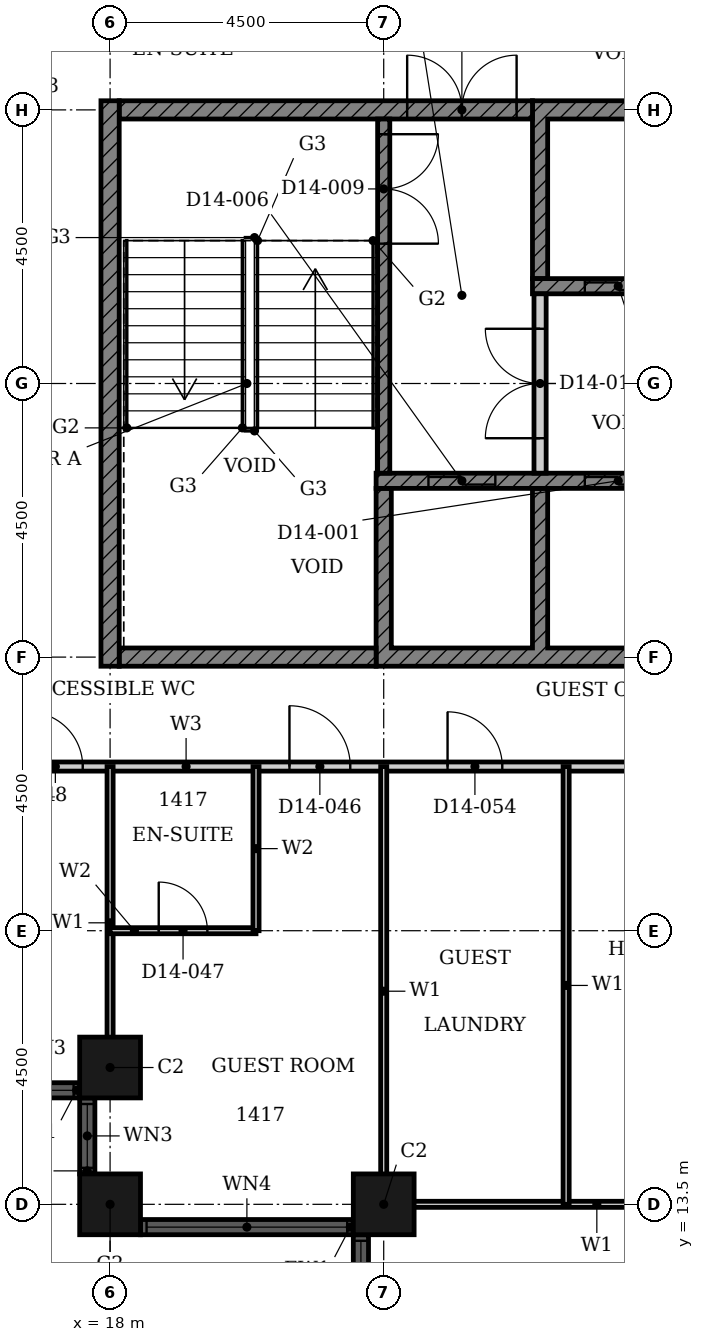
"""IFC4 building model, lengths in metres.
Left out: names, types, materials, properties, quantities, classifications, styles, units other than length and angle.
Written with IfcOpenShell. Run it as: python <this file> out.ifc"""

import sys

from ifc_helpers import new_model, si_unit, direction, frame, frame_2d, origin, origin_2d, place, context, subcontext, project, spatial, polyline, rectangle, hollow_rectangle, outline, extrude, element, fill, save


model = new_model("IFC4")
c1 = context("Model", 3, precision=1e-05, world=origin(), true_north=direction((0.0, 1.0)))
c2 = subcontext(c1, "Body", "Model", "MODEL_VIEW")
j1 = project(units=[si_unit("LENGTHUNIT", "METRE"), si_unit("PLANEANGLEUNIT", "RADIAN")], contexts=[c1])
p1 = place(None, origin())
s1 = spatial("IfcSite", under=j1, at=p1, CompositionType="ELEMENT")
p2 = place(p1, origin())
s2 = spatial("IfcBuilding", under=s1, at=p2, CompositionType="ELEMENT")
p3 = place(p2, frame((0.0, 0.0, 63.6)))
s3 = spatial("IfcBuildingStorey", under=s2, at=p3, CompositionType="ELEMENT", Elevation=63.6)
for number, where, z_axis, x_axis in (
    (1, (18.0, 15.75, 0.0), (0.0, 0.0, 1.0), (1.0, 0.0, 0.0)),
    (2, (18.0, 13.5, 0.0), (0.0, 0.0, 1.0), (1.0, 0.0, 0.0)),
    (3, (22.5, 13.5, 0.0), (0.0, 0.0, 1.0), (1.0, 0.0, 0.0)),
):
    element("IfcColumn", number, at=place(p3, frame(where, z_axis=z_axis, x_axis=x_axis)), inside=s3, PredefinedType="COLUMN", context=c2, shape_type="SweptSolid", body=[
        extrude(hollow_rectangle(XDim=1.0, YDim=1.0, WallThickness=0.032, at=origin_2d()), origin(), (0.0, 0.0, 1.0), 3.6),
    ])
p4 = place(p3, frame((16.25, 15.375, 0.0), z_axis=(0.0, 0.0, 1.0), x_axis=(1.0, 0.0, 0.0)))
e4 = element("IfcWall", 4, at=p4, inside=s3, PredefinedType="SOLIDWALL", context=c2, shape_type="SweptSolid", body=[
    extrude(rectangle(XDim=1.25, YDim=0.25, at=frame_2d((0.625, 0.0))), origin(), (0.0, 0.0, 1.0), 3.6),
])
p5 = place(p4, frame((0.1, 0.0, 0.9)))
e5 = element("IfcOpeningElement", 5, at=p5, cuts=e4, PredefinedType="OPENING", context=c2, shape_type="SweptSolid", body=[
    extrude(rectangle(XDim=1.05, YDim=2.08, at=frame_2d((0.525, 1.04))), frame((0.0, 0.135, 0.0), z_axis=(0.0, -1.0, 0.0), x_axis=(1.0, 0.0, 0.0)), (0.0, 0.0, 1.0), 0.27),
])
p6 = place(p3, frame((17.625, 15.25, 0.0), z_axis=(0.0, 0.0, 1.0), x_axis=(0.0, -1.0, 0.0)))
e6 = element("IfcWall", 6, at=p6, inside=s3, PredefinedType="SOLIDWALL", context=c2, shape_type="SweptSolid", body=[
    extrude(rectangle(XDim=1.25, YDim=0.25, at=frame_2d((0.625, 0.0))), origin(), (0.0, 0.0, 1.0), 3.6),
])
p7 = place(p6, frame((0.1, 0.0, 0.9)))
e7 = element("IfcOpeningElement", 7, at=p7, cuts=e6, PredefinedType="OPENING", context=c2, shape_type="SweptSolid", body=[
    extrude(rectangle(XDim=1.05, YDim=2.08, at=frame_2d((0.525, 1.04))), frame((0.0, 0.135, 0.0), z_axis=(0.0, -1.0, 0.0), x_axis=(1.0, 0.0, 0.0)), (0.0, 0.0, 1.0), 0.27),
])
p8 = place(p3, frame((18.5, 13.125, 0.0), z_axis=(0.0, 0.0, 1.0), x_axis=(1.0, 0.0, 0.0)))
e8 = element("IfcWall", 8, at=p8, inside=s3, PredefinedType="SOLIDWALL", context=c2, shape_type="SweptSolid", body=[
    extrude(rectangle(XDim=3.5, YDim=0.25, at=frame_2d((1.75, 0.0))), origin(), (0.0, 0.0, 1.0), 3.6),
])
p9 = place(p8, frame((0.1, 0.0, 0.9)))
e9 = element("IfcOpeningElement", 9, at=p9, cuts=e8, PredefinedType="OPENING", context=c2, shape_type="SweptSolid", body=[
    extrude(rectangle(XDim=3.3, YDim=2.08, at=frame_2d((1.65, 1.04))), frame((0.0, 0.135, 0.0), z_axis=(0.0, -1.0, 0.0), x_axis=(1.0, 0.0, 0.0)), (0.0, 0.0, 1.0), 0.27),
])
p10 = place(p3, frame((22.125, 13.0, 0.0), z_axis=(0.0, 0.0, 1.0), x_axis=(0.0, -1.0, 0.0)))
e10 = element("IfcWall", 10, at=p10, inside=s3, PredefinedType="SOLIDWALL", context=c2, shape_type="SweptSolid", body=[
    extrude(rectangle(XDim=8.0, YDim=0.25, at=frame_2d((4.0, 0.0))), origin(), (0.0, 0.0, 1.0), 3.6),
])
p11 = place(p10, frame((0.1, 0.0, 0.9)))
e11 = element("IfcOpeningElement", 11, at=p11, cuts=e10, PredefinedType="OPENING", context=c2, shape_type="SweptSolid", body=[
    extrude(rectangle(XDim=3.3, YDim=2.08, at=frame_2d((1.65, 1.04))), frame((0.0, 0.135, 0.0), z_axis=(0.0, -1.0, 0.0), x_axis=(1.0, 0.0, 0.0)), (0.0, 0.0, 1.0), 0.27),
])
p12 = place(p10, frame((4.6, 0.0, 0.9)))
e12 = element("IfcOpeningElement", 12, at=p12, cuts=e10, PredefinedType="OPENING", context=c2, shape_type="SweptSolid", body=[
    extrude(rectangle(XDim=3.3, YDim=2.08, at=frame_2d((1.65, 1.04))), frame((0.0, 0.135, 0.0), z_axis=(0.0, -1.0, 0.0), x_axis=(1.0, 0.0, 0.0)), (0.0, 0.0, 1.0), 0.27),
])
p13 = place(p3, origin())
e13 = element("IfcWall", 13, at=p13, inside=s3, PredefinedType="SHEAR", context=c2, shape_type="SweptSolid", body=[
    extrude(outline(polyline([(22.375, 22.35), (38.053, 22.35), (38.053, 25.275), (37.803, 25.275), (37.803, 22.65), (35.482, 22.65), (35.482, 25.275), (35.232, 25.275), (35.232, 22.65), (32.911, 22.65), (32.911, 25.275), (32.661, 25.275), (32.661, 22.65), (30.339, 22.65), (30.339, 25.275), (30.089, 25.275), (30.089, 22.65), (27.768, 22.65), (27.768, 25.275), (27.518, 25.275), (27.518, 22.65), (25.197, 22.65), (25.197, 25.275), (24.947, 25.275), (24.947, 22.65), (22.625, 22.65), (22.625, 25.275), (22.375, 25.275), (22.375, 22.35)])), origin(), (0.0, 0.0, 1.0), 3.3),
])
p14 = place(p3, origin())
e14 = element("IfcWall", 14, at=p14, inside=s3, PredefinedType="SHEAR", context=c2, shape_type="SweptSolid", body=[
    extrude(outline(polyline([(24.947, 28.725), (25.197, 28.725), (25.197, 31.35), (27.518, 31.35), (27.518, 28.725), (27.768, 28.725), (27.768, 31.35), (30.089, 31.35), (30.089, 28.725), (30.339, 28.725), (30.339, 31.35), (32.661, 31.35), (32.661, 28.725), (32.911, 28.725), (32.911, 31.35), (35.232, 31.35), (35.232, 28.725), (35.482, 28.725), (35.482, 31.35), (37.803, 31.35), (37.803, 28.725), (38.053, 28.725), (38.053, 31.35), (40.375, 31.35), (40.375, 28.725), (40.625, 28.725), (40.625, 31.65), (24.947, 31.65), (24.947, 28.725)])), origin(), (0.0, 0.0, 1.0), 3.3),
])
p15 = place(p3, frame((18.15, 22.5, 0.0), z_axis=(0.0, 0.0, 1.0), x_axis=(1.0, 0.0, 0.0)))
e15 = element("IfcWall", 15, at=p15, inside=s3, PredefinedType="SHEAR", context=c2, shape_type="SweptSolid", body=[
    extrude(rectangle(XDim=4.225, YDim=0.3, at=frame_2d((2.113, 0.0))), origin(), (0.0, 0.0, 1.0), 3.3),
])
p16 = place(p3, frame((18.15, 31.5, 0.0), z_axis=(0.0, 0.0, 1.0), x_axis=(1.0, 0.0, 0.0)))
e16 = element("IfcWall", 16, at=p16, inside=s3, PredefinedType="SHEAR", context=c2, shape_type="SweptSolid", body=[
    extrude(rectangle(XDim=6.797, YDim=0.3, at=frame_2d((3.398, 0.0))), origin(), (0.0, 0.0, 1.0), 3.3),
])
p17 = place(p16, frame((4.736, 0.0, 0.0)))
e17 = element("IfcOpeningElement", 17, at=p17, cuts=e16, PredefinedType="OPENING", context=c2, shape_type="SweptSolid", body=[
    extrude(rectangle(XDim=1.8, YDim=2.1, at=frame_2d((0.9, 1.05))), frame((0.0, 0.16, 0.0), z_axis=(0.0, -1.0, 0.0), x_axis=(1.0, 0.0, 0.0)), (0.0, 0.0, 1.0), 0.32),
])
p18 = place(p3, frame((18.0, 22.35, 0.0), z_axis=(0.0, 0.0, 1.0), x_axis=(0.0, 1.0, 0.0)))
e18 = element("IfcWall", 18, at=p18, inside=s3, PredefinedType="SHEAR", context=c2, shape_type="SweptSolid", body=[
    extrude(rectangle(XDim=9.3, YDim=0.3, at=frame_2d((4.65, 0.0))), origin(), (0.0, 0.0, 1.0), 3.3),
])
p19 = place(p3, frame((22.375, 25.4, 0.0), z_axis=(0.0, 0.0, 1.0), x_axis=(1.0, 0.0, 0.0)))
e19 = element("IfcWall", 19, at=p19, inside=s3, PredefinedType="SHEAR", context=c2, shape_type="SweptSolid", body=[
    extrude(rectangle(XDim=15.678, YDim=0.25, at=frame_2d((7.839, 0.0))), origin(), (0.0, 0.0, 1.0), 3.3),
])
p20 = place(p19, frame((3.432, 0.0, 0.0)))
e20 = element("IfcOpeningElement", 20, at=p20, cuts=e19, PredefinedType="OPENING", context=c2, shape_type="SweptSolid", body=[
    extrude(rectangle(XDim=1.1, YDim=2.1, at=frame_2d((0.55, 1.05))), frame((0.0, 0.135, 0.0), z_axis=(0.0, -1.0, 0.0), x_axis=(1.0, 0.0, 0.0)), (0.0, 0.0, 1.0), 0.27),
])
p21 = place(p19, frame((11.146, 0.0, 0.0)))
e21 = element("IfcOpeningElement", 21, at=p21, cuts=e19, PredefinedType="OPENING", context=c2, shape_type="SweptSolid", body=[
    extrude(rectangle(XDim=1.1, YDim=2.1, at=frame_2d((0.55, 1.05))), frame((0.0, 0.135, 0.0), z_axis=(0.0, -1.0, 0.0), x_axis=(1.0, 0.0, 0.0)), (0.0, 0.0, 1.0), 0.27),
])
p22 = place(p19, frame((13.718, 0.0, 0.0)))
e22 = element("IfcOpeningElement", 22, at=p22, cuts=e19, PredefinedType="OPENING", context=c2, shape_type="SweptSolid", body=[
    extrude(rectangle(XDim=1.1, YDim=2.1, at=frame_2d((0.55, 1.05))), frame((0.0, 0.135, 0.0), z_axis=(0.0, -1.0, 0.0), x_axis=(1.0, 0.0, 0.0)), (0.0, 0.0, 1.0), 0.27),
])
p23 = place(p19, frame((0.861, 0.0, 0.0)))
e23 = element("IfcOpeningElement", 23, at=p23, cuts=e19, PredefinedType="OPENING", context=c2, shape_type="SweptSolid", body=[
    extrude(rectangle(XDim=1.1, YDim=2.1, at=frame_2d((0.55, 1.05))), frame((0.0, 0.135, 0.0), z_axis=(0.0, -1.0, 0.0), x_axis=(1.0, 0.0, 0.0)), (0.0, 0.0, 1.0), 0.27),
])
p24 = place(p3, frame((24.947, 28.6, 0.0), z_axis=(0.0, 0.0, 1.0), x_axis=(1.0, 0.0, 0.0)))
e24 = element("IfcWall", 24, at=p24, inside=s3, PredefinedType="SHEAR", context=c2, shape_type="SweptSolid", body=[
    extrude(rectangle(XDim=15.678, YDim=0.25, at=frame_2d((7.839, 0.0))), origin(), (0.0, 0.0, 1.0), 3.3),
])
p25 = place(p24, frame((0.861, 0.0, 0.0)))
e25 = element("IfcOpeningElement", 25, at=p25, cuts=e24, PredefinedType="OPENING", context=c2, shape_type="SweptSolid", body=[
    extrude(rectangle(XDim=1.1, YDim=2.1, at=frame_2d((0.55, 1.05))), frame((0.0, 0.135, 0.0), z_axis=(0.0, -1.0, 0.0), x_axis=(1.0, 0.0, 0.0)), (0.0, 0.0, 1.0), 0.27),
])
p26 = place(p24, frame((8.575, 0.0, 0.0)))
e26 = element("IfcOpeningElement", 26, at=p26, cuts=e24, PredefinedType="OPENING", context=c2, shape_type="SweptSolid", body=[
    extrude(rectangle(XDim=1.1, YDim=2.1, at=frame_2d((0.55, 1.05))), frame((0.0, 0.135, 0.0), z_axis=(0.0, -1.0, 0.0), x_axis=(1.0, 0.0, 0.0)), (0.0, 0.0, 1.0), 0.27),
])
p27 = place(p24, frame((13.718, 0.0, 0.0)))
e27 = element("IfcOpeningElement", 27, at=p27, cuts=e24, PredefinedType="OPENING", context=c2, shape_type="SweptSolid", body=[
    extrude(rectangle(XDim=1.1, YDim=2.1, at=frame_2d((0.55, 1.05))), frame((0.0, 0.135, 0.0), z_axis=(0.0, -1.0, 0.0), x_axis=(1.0, 0.0, 0.0)), (0.0, 0.0, 1.0), 0.27),
])
p28 = place(p3, frame((22.5, 31.35, 0.0), z_axis=(0.0, 0.0, 1.0), x_axis=(0.0, -1.0, 0.0)))
e28 = element("IfcWall", 28, at=p28, inside=s3, PredefinedType="SHEAR", context=c2, shape_type="SweptSolid", body=[
    extrude(rectangle(XDim=5.825, YDim=0.2, at=frame_2d((2.913, 0.0))), origin(), (0.0, 0.0, 1.0), 3.3),
])
p29 = place(p28, frame((0.25, 0.0, 0.0)))
e29 = element("IfcOpeningElement", 29, at=p29, cuts=e28, PredefinedType="OPENING", context=c2, shape_type="SweptSolid", body=[
    extrude(rectangle(XDim=1.8, YDim=2.1, at=frame_2d((0.9, 1.05))), frame((0.0, 0.11, 0.0), z_axis=(0.0, -1.0, 0.0), x_axis=(1.0, 0.0, 0.0)), (0.0, 0.0, 1.0), 0.22),
])
p30 = place(p3, frame((25.072, 25.525, 0.0), z_axis=(0.0, 0.0, 1.0), x_axis=(0.0, 1.0, 0.0)))
e30 = element("IfcWall", 30, at=p30, inside=s3, PredefinedType="PARTITIONING", context=c2, shape_type="SweptSolid", body=[
    extrude(rectangle(XDim=2.95, YDim=0.2, at=frame_2d((1.475, 0.0))), origin(), (0.0, 0.0, 1.0), 3.3),
])
p31 = place(p30, frame((0.575, 0.0, 0.0)))
e31 = element("IfcOpeningElement", 31, at=p31, cuts=e30, PredefinedType="OPENING", context=c2, shape_type="SweptSolid", body=[
    extrude(rectangle(XDim=1.8, YDim=2.1, at=frame_2d((0.9, 1.05))), frame((0.0, 0.11, 0.0), z_axis=(0.0, -1.0, 0.0), x_axis=(1.0, 0.0, 0.0)), (0.0, 0.0, 1.0), 0.22),
])
p32 = place(p3, frame((16.2, 20.7, 0.0), z_axis=(0.0, 0.0, 1.0), x_axis=(1.0, 0.0, 0.0)))
e32 = element("IfcWall", 32, at=p32, inside=s3, PredefinedType="PARTITIONING", context=c2, shape_type="SweptSolid", body=[
    extrude(rectangle(XDim=13.5, YDim=0.15, at=frame_2d((6.75, 0.0))), origin(), (0.0, 0.0, 1.0), 3.3),
])
p33 = place(p32, frame((4.75, 0.0, 0.0)))
e33 = element("IfcOpeningElement", 33, at=p33, cuts=e32, PredefinedType="OPENING", context=c2, shape_type="SweptSolid", body=[
    extrude(rectangle(XDim=1.0, YDim=2.1, at=frame_2d((0.5, 1.05))), frame((0.0, 0.085, 0.0), z_axis=(0.0, -1.0, 0.0), x_axis=(1.0, 0.0, 0.0)), (0.0, 0.0, 1.0), 0.17),
])
p34 = place(p32, frame((0.45, 0.0, 0.0)))
e34 = element("IfcOpeningElement", 34, at=p34, cuts=e32, PredefinedType="OPENING", context=c2, shape_type="SweptSolid", body=[
    extrude(rectangle(XDim=0.9, YDim=2.1, at=frame_2d((0.45, 1.05))), frame((0.0, 0.085, 0.0), z_axis=(0.0, -1.0, 0.0), x_axis=(1.0, 0.0, 0.0)), (0.0, 0.0, 1.0), 0.17),
])
p35 = place(p32, frame((7.35, 0.0, 0.0)))
e35 = element("IfcOpeningElement", 35, at=p35, cuts=e32, PredefinedType="OPENING", context=c2, shape_type="SweptSolid", body=[
    extrude(rectangle(XDim=0.9, YDim=2.1, at=frame_2d((0.45, 1.05))), frame((0.0, 0.085, 0.0), z_axis=(0.0, -1.0, 0.0), x_axis=(1.0, 0.0, 0.0)), (0.0, 0.0, 1.0), 0.17),
])
p36 = place(p32, frame((10.95, 0.0, 0.0)))
e36 = element("IfcOpeningElement", 36, at=p36, cuts=e32, PredefinedType="OPENING", context=c2, shape_type="SweptSolid", body=[
    extrude(rectangle(XDim=0.9, YDim=2.1, at=frame_2d((0.45, 1.05))), frame((0.0, 0.085, 0.0), z_axis=(0.0, -1.0, 0.0), x_axis=(1.0, 0.0, 0.0)), (0.0, 0.0, 1.0), 0.17),
])
p37 = place(p3, frame((22.31, 13.5, 0.0), z_axis=(0.0, 0.0, 1.0), x_axis=(1.0, 0.0, 0.0)))
e37 = element("IfcWall", 37, at=p37, inside=s3, PredefinedType="PARTITIONING", context=c2, shape_type="SweptSolid", body=[
    extrude(rectangle(XDim=7.39, YDim=0.1, at=frame_2d((3.695, 0.0))), origin(), (0.0, 0.0, 1.0), 2.38),
])
p38 = place(p3, frame((18.0, 15.56, 0.0), z_axis=(0.0, 0.0, 1.0), x_axis=(0.0, 1.0, 0.0)))
e38 = element("IfcWall", 38, at=p38, inside=s3, PredefinedType="PARTITIONING", context=c2, shape_type="SweptSolid", body=[
    extrude(rectangle(XDim=5.14, YDim=0.1, at=frame_2d((2.57, 0.0))), origin(), (0.0, 0.0, 1.0), 3.3),
])
p39 = place(p3, frame((22.5, 13.31, 0.0), z_axis=(0.0, 0.0, 1.0), x_axis=(0.0, 1.0, 0.0)))
e39 = element("IfcWall", 39, at=p39, inside=s3, PredefinedType="PARTITIONING", context=c2, shape_type="SweptSolid", body=[
    extrude(rectangle(XDim=7.39, YDim=0.1, at=frame_2d((3.695, 0.0))), origin(), (0.0, 0.0, 1.0), 3.3),
])
p40 = place(p3, frame((25.5, 13.5, 0.0), z_axis=(0.0, 0.0, 1.0), x_axis=(0.0, 1.0, 0.0)))
e40 = element("IfcWall", 40, at=p40, inside=s3, PredefinedType="PARTITIONING", context=c2, shape_type="SweptSolid", body=[
    extrude(rectangle(XDim=7.2, YDim=0.1, at=frame_2d((3.6, 0.0))), origin(), (0.0, 0.0, 1.0), 3.3),
])
p41 = place(p3, frame((18.0, 18.0, 0.0), z_axis=(0.0, 0.0, 1.0), x_axis=(1.0, 0.0, 0.0)))
e41 = element("IfcWall", 41, at=p41, inside=s3, PredefinedType="PARTITIONING", context=c2, shape_type="SweptSolid", body=[
    extrude(rectangle(XDim=2.4, YDim=0.1, at=frame_2d((1.2, 0.0))), origin(), (0.0, 0.0, 1.0), 3.3),
])
p42 = place(p41, frame((0.8, 0.0, 0.0)))
e42 = element("IfcOpeningElement", 42, at=p42, cuts=e41, PredefinedType="OPENING", context=c2, shape_type="SweptSolid", body=[
    extrude(rectangle(XDim=0.8, YDim=2.1, at=frame_2d((0.4, 1.05))), frame((0.0, 0.06, 0.0), z_axis=(0.0, -1.0, 0.0), x_axis=(1.0, 0.0, 0.0)), (0.0, 0.0, 1.0), 0.12),
])
p43 = place(p3, frame((20.4, 18.0, 0.0), z_axis=(0.0, 0.0, 1.0), x_axis=(0.0, 1.0, 0.0)))
e43 = element("IfcWall", 43, at=p43, inside=s3, PredefinedType="PARTITIONING", context=c2, shape_type="SweptSolid", body=[
    extrude(rectangle(XDim=2.7, YDim=0.1, at=frame_2d((1.35, 0.0))), origin(), (0.0, 0.0, 1.0), 3.3),
])
p44 = place(p5, origin())
e44 = element("IfcWindow", 44, at=p44, inside=s3, PartitioningType="SINGLE_PANEL", PredefinedType="WINDOW", context=c2, shape_type="SweptSolid", body=[
    extrude(rectangle(XDim=1.05, YDim=2.08, at=frame_2d((0.525, 1.04))), frame((0.0, 0.03, 0.0), z_axis=(0.0, -1.0, 0.0), x_axis=(1.0, 0.0, 0.0)), (0.0, 0.0, 1.0), 0.06),
])
fill(e5, e44)
p45 = place(p7, origin())
e45 = element("IfcWindow", 45, at=p45, inside=s3, PartitioningType="SINGLE_PANEL", PredefinedType="WINDOW", context=c2, shape_type="SweptSolid", body=[
    extrude(rectangle(XDim=1.05, YDim=2.08, at=frame_2d((0.525, 1.04))), frame((0.0, 0.03, 0.0), z_axis=(0.0, -1.0, 0.0), x_axis=(1.0, 0.0, 0.0)), (0.0, 0.0, 1.0), 0.06),
])
fill(e7, e45)
p46 = place(p9, origin())
e46 = element("IfcWindow", 46, at=p46, inside=s3, PartitioningType="SINGLE_PANEL", PredefinedType="WINDOW", context=c2, shape_type="SweptSolid", body=[
    extrude(rectangle(XDim=3.3, YDim=2.08, at=frame_2d((1.65, 1.04))), frame((0.0, 0.03, 0.0), z_axis=(0.0, -1.0, 0.0), x_axis=(1.0, 0.0, 0.0)), (0.0, 0.0, 1.0), 0.06),
])
fill(e9, e46)
p47 = place(p11, origin())
e47 = element("IfcWindow", 47, at=p47, inside=s3, PartitioningType="SINGLE_PANEL", PredefinedType="WINDOW", context=c2, shape_type="SweptSolid", body=[
    extrude(rectangle(XDim=3.3, YDim=2.08, at=frame_2d((1.65, 1.04))), frame((0.0, 0.03, 0.0), z_axis=(0.0, -1.0, 0.0), x_axis=(1.0, 0.0, 0.0)), (0.0, 0.0, 1.0), 0.06),
])
fill(e11, e47)
p48 = place(p20, origin())
e48 = element("IfcDoor", 48, at=p48, inside=s3, OperationType="DOUBLE_DOOR_SLIDING", PredefinedType="DOOR", context=c2, shape_type="SweptSolid", body=[
    extrude(rectangle(XDim=1.1, YDim=2.1, at=frame_2d((0.55, 1.05))), frame((0.0, 0.025, 0.0), z_axis=(0.0, -1.0, 0.0), x_axis=(1.0, 0.0, 0.0)), (0.0, 0.0, 1.0), 0.05),
])
fill(e20, e48)
p49 = place(p25, origin())
e49 = element("IfcDoor", 49, at=p49, inside=s3, OperationType="DOUBLE_DOOR_SLIDING", PredefinedType="DOOR", context=c2, shape_type="SweptSolid", body=[
    extrude(rectangle(XDim=1.1, YDim=2.1, at=frame_2d((0.55, 1.05))), frame((0.0, 0.025, 0.0), z_axis=(0.0, -1.0, 0.0), x_axis=(1.0, 0.0, 0.0)), (0.0, 0.0, 1.0), 0.05),
])
fill(e25, e49)
p50 = place(p23, origin())
e50 = element("IfcDoor", 50, at=p50, inside=s3, OperationType="DOUBLE_DOOR_SLIDING", PredefinedType="DOOR", context=c2, shape_type="SweptSolid", body=[
    extrude(rectangle(XDim=1.1, YDim=2.1, at=frame_2d((0.55, 1.05))), frame((0.0, 0.025, 0.0), z_axis=(0.0, -1.0, 0.0), x_axis=(1.0, 0.0, 0.0)), (0.0, 0.0, 1.0), 0.05),
])
fill(e23, e50)
p51 = place(p29, origin())
e51 = element("IfcDoor", 51, at=p51, inside=s3, OperationType="DOUBLE_DOOR_SINGLE_SWING", PredefinedType="DOOR", context=c2, shape_type="SweptSolid", body=[
    extrude(rectangle(XDim=1.8, YDim=2.1, at=frame_2d((0.9, 1.05))), frame((0.0, 0.025, 0.0), z_axis=(0.0, -1.0, 0.0), x_axis=(1.0, 0.0, 0.0)), (0.0, 0.0, 1.0), 0.05),
])
fill(e29, e51)
p52 = place(p31, origin())
e52 = element("IfcDoor", 52, at=p52, inside=s3, OperationType="DOUBLE_DOOR_SINGLE_SWING", PredefinedType="DOOR", context=c2, shape_type="SweptSolid", body=[
    extrude(rectangle(XDim=1.8, YDim=2.1, at=frame_2d((0.9, 1.05))), frame((0.0, 0.025, 0.0), z_axis=(0.0, -1.0, 0.0), x_axis=(1.0, 0.0, 0.0)), (0.0, 0.0, 1.0), 0.05),
])
fill(e31, e52)
p53 = place(p17, origin())
e53 = element("IfcDoor", 53, at=p53, inside=s3, OperationType="DOUBLE_DOOR_SINGLE_SWING", PredefinedType="DOOR", context=c2, shape_type="SweptSolid", body=[
    extrude(rectangle(XDim=1.8, YDim=2.1, at=frame_2d((0.9, 1.05))), frame((0.0, 0.025, 0.0), z_axis=(0.0, -1.0, 0.0), x_axis=(1.0, 0.0, 0.0)), (0.0, 0.0, 1.0), 0.05),
])
fill(e17, e53)
p54 = place(p33, origin())
e54 = element("IfcDoor", 54, at=p54, inside=s3, OperationType="SINGLE_SWING_RIGHT", PredefinedType="DOOR", context=c2, shape_type="SweptSolid", body=[
    extrude(rectangle(XDim=1.0, YDim=2.1, at=frame_2d((0.5, 1.05))), frame((0.0, 0.025, 0.0), z_axis=(0.0, -1.0, 0.0), x_axis=(1.0, 0.0, 0.0)), (0.0, 0.0, 1.0), 0.05),
])
fill(e33, e54)
p55 = place(p42, origin())
e55 = element("IfcDoor", 55, at=p55, inside=s3, OperationType="SINGLE_SWING_RIGHT", PredefinedType="DOOR", context=c2, shape_type="SweptSolid", body=[
    extrude(rectangle(XDim=0.8, YDim=2.1, at=frame_2d((0.4, 1.05))), frame((0.0, 0.025, 0.0), z_axis=(0.0, -1.0, 0.0), x_axis=(1.0, 0.0, 0.0)), (0.0, 0.0, 1.0), 0.05),
])
fill(e42, e55)
p56 = place(p34, origin())
e56 = element("IfcDoor", 56, at=p56, inside=s3, OperationType="SINGLE_SWING_RIGHT", PredefinedType="DOOR", context=c2, shape_type="SweptSolid", body=[
    extrude(rectangle(XDim=0.9, YDim=2.1, at=frame_2d((0.45, 1.05))), frame((0.0, 0.025, 0.0), z_axis=(0.0, -1.0, 0.0), x_axis=(1.0, 0.0, 0.0)), (0.0, 0.0, 1.0), 0.05),
])
fill(e34, e56)
p57 = place(p35, origin())
e57 = element("IfcDoor", 57, at=p57, inside=s3, OperationType="SINGLE_SWING_LEFT", PredefinedType="DOOR", context=c2, shape_type="SweptSolid", body=[
    extrude(rectangle(XDim=0.9, YDim=2.1, at=frame_2d((0.45, 1.05))), frame((0.0, 0.025, 0.0), z_axis=(0.0, -1.0, 0.0), x_axis=(1.0, 0.0, 0.0)), (0.0, 0.0, 1.0), 0.05),
])
fill(e35, e57)
save(model, sys.argv[1])
